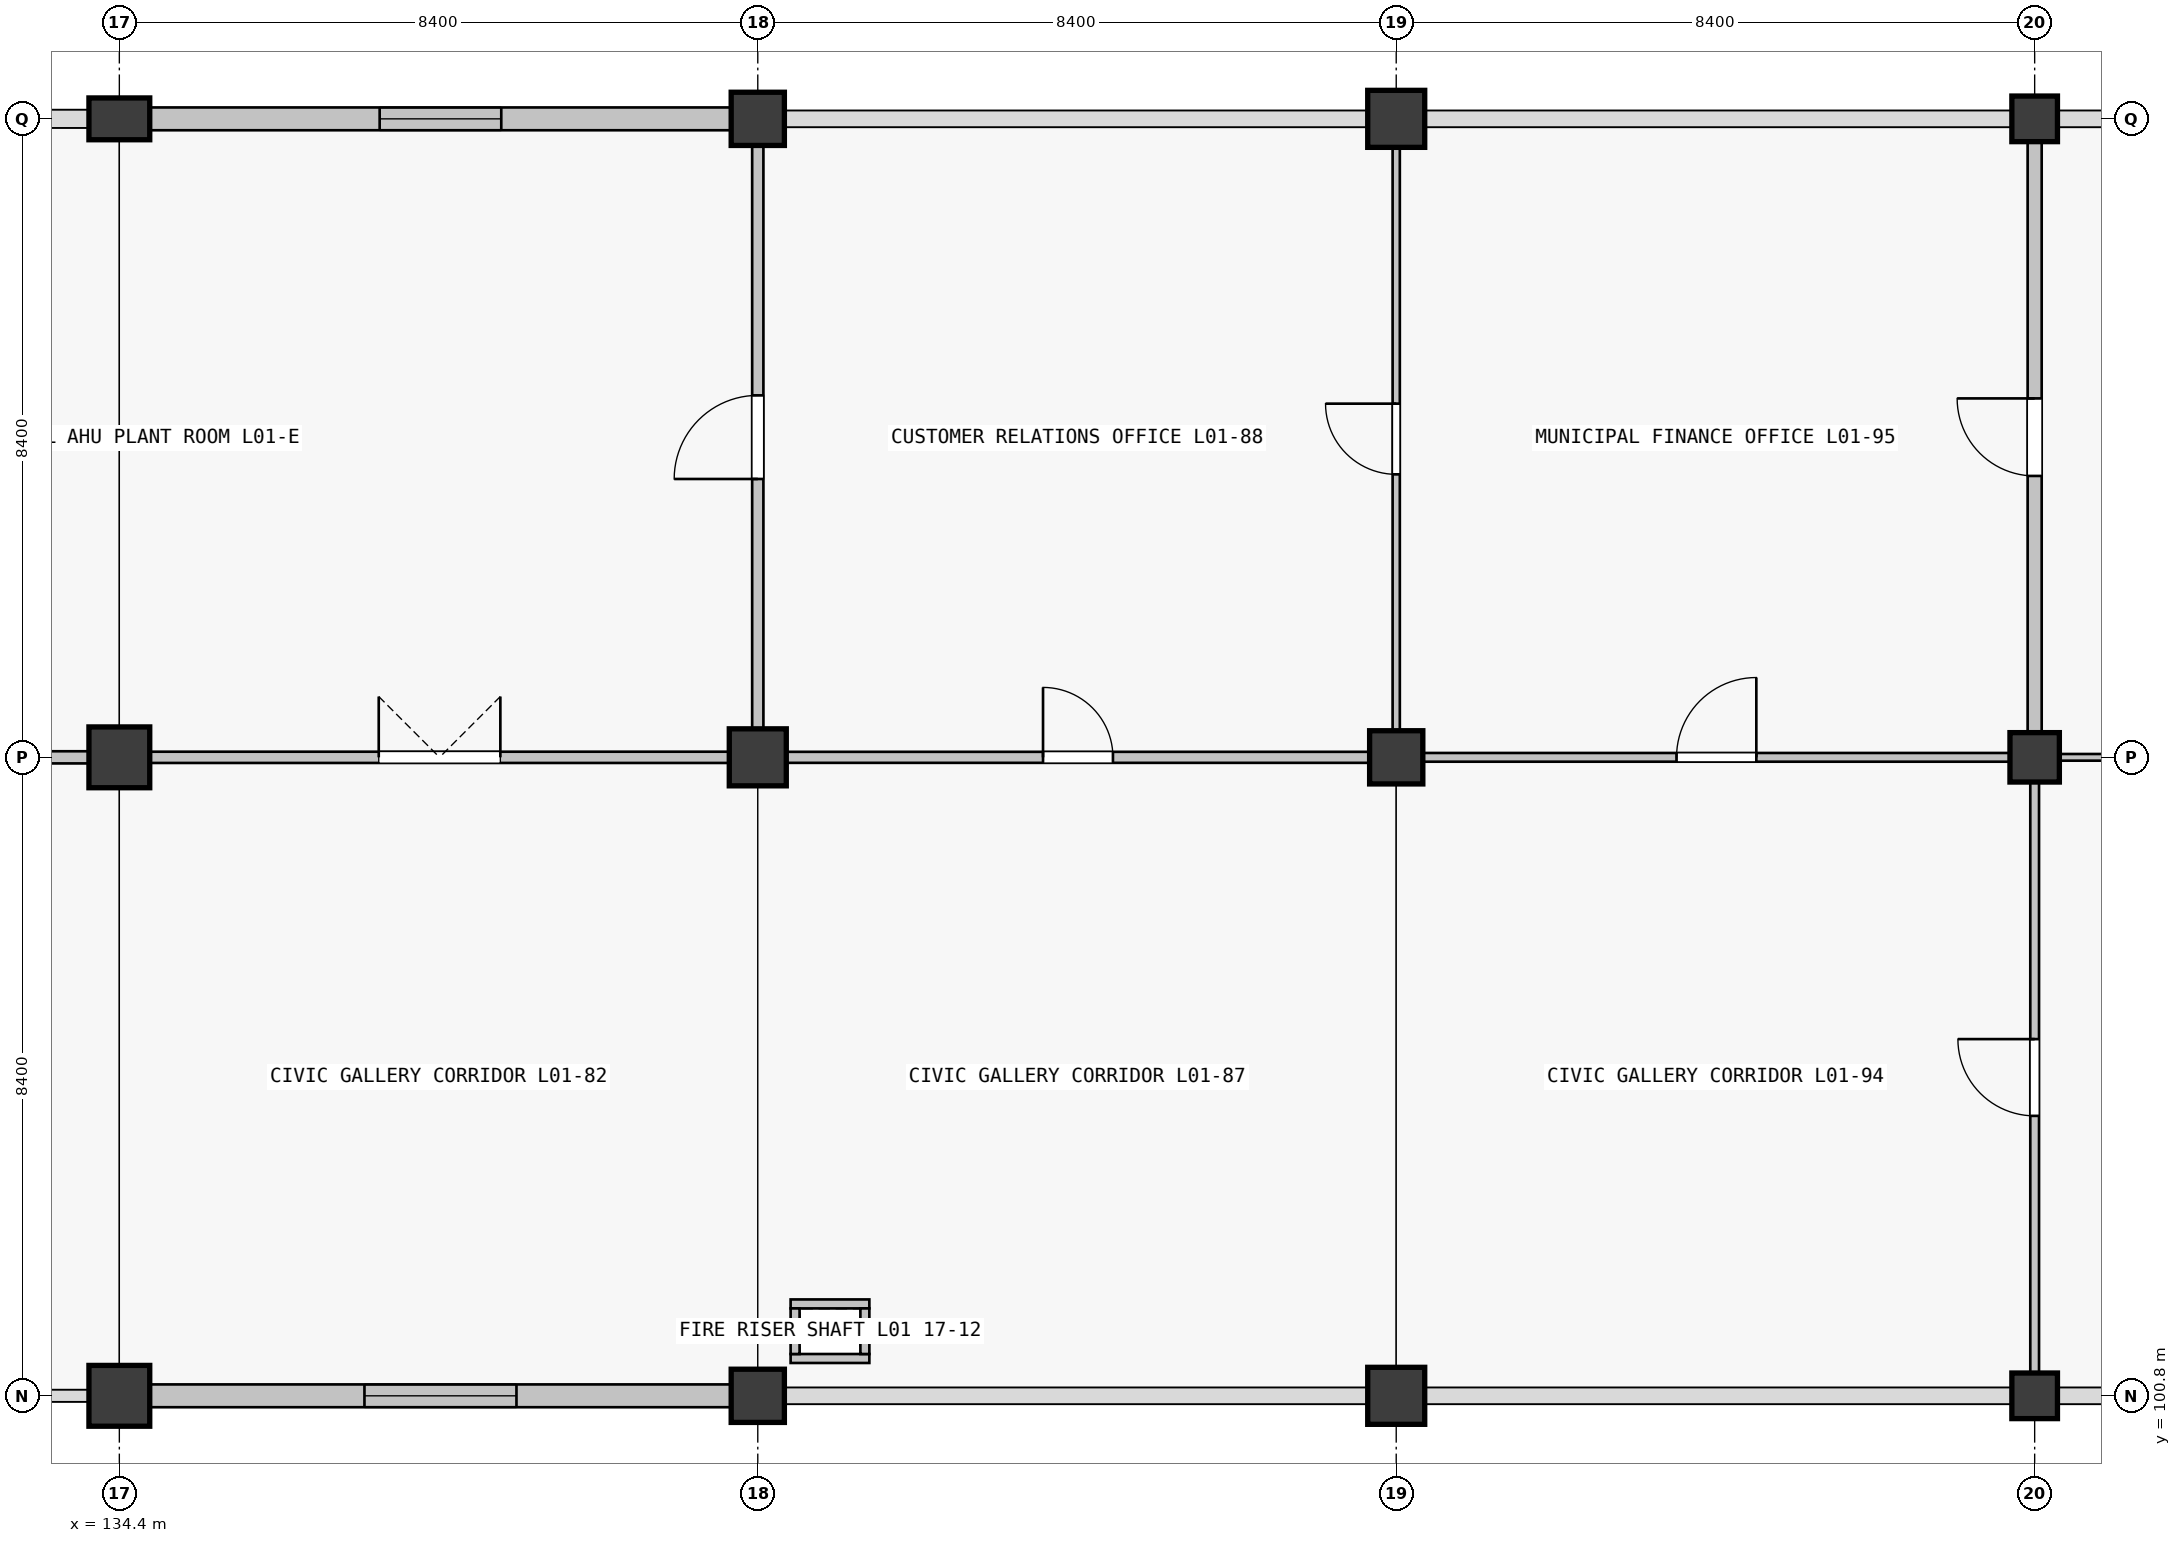
"""IFC4 building model, lengths in metres.
Left out: names, types, materials, properties, quantities, classifications, styles, units other than length and angle.
Written with IfcOpenShell. Run it as: python <this file> out.ifc"""

import sys

from ifc_helpers import new_model, si_unit, direction, frame, frame_2d, origin, origin_2d, place, context, subcontext, project, spatial, rectangle, extrude, element, fill, save


model = new_model("IFC4")
c1 = context("Model", 3, precision=1e-05, world=origin(), true_north=direction((0.0, 1.0)))
c2 = subcontext(c1, "Body", "Model", "MODEL_VIEW")
j1 = project(units=[si_unit("LENGTHUNIT", "METRE"), si_unit("PLANEANGLEUNIT", "RADIAN")], contexts=[c1])
p1 = place(None, origin())
s1 = spatial("IfcSite", under=j1, at=p1, CompositionType="ELEMENT")
p2 = place(p1, origin())
s2 = spatial("IfcBuilding", under=s1, at=p2, CompositionType="ELEMENT")
p3 = place(p2, frame((0.0, 0.0, 5.76)))
s3 = spatial("IfcBuildingStorey", under=s2, at=p3, CompositionType="ELEMENT", Elevation=5.76)
for number, where, z_axis, x_axis in (
    (1, (134.4, 100.8, 0.0), (0.0, 0.0, 1.0), (1.0, 0.0, 0.0)),
    (2, (134.4, 109.2, 0.0), (0.0, 0.0, 1.0), (1.0, 0.0, 0.0)),
):
    element("IfcColumn", number, at=place(p3, frame(where, z_axis=z_axis, x_axis=x_axis)), inside=s3, PredefinedType="COLUMN", context=c2, shape_type="SweptSolid", body=[
        extrude(rectangle(XDim=0.8, YDim=0.8, at=origin_2d()), origin(), (0.0, 0.0, 1.0), 4.5),
    ])
p4 = place(p3, frame((134.4, 117.6, 0.0), z_axis=(0.0, 0.0, 1.0), x_axis=(1.0, 0.0, 0.0)))
e3 = element("IfcColumn", 3, at=p4, inside=s3, PredefinedType="COLUMN", context=c2, shape_type="SweptSolid", body=[
    extrude(rectangle(XDim=0.8, YDim=0.55, at=origin_2d()), origin(), (0.0, 0.0, 1.0), 4.5),
])
p5 = place(p3, frame((142.8, 100.8, 0.0), z_axis=(0.0, 0.0, 1.0), x_axis=(1.0, 0.0, 0.0)))
e4 = element("IfcColumn", 4, at=p5, inside=s3, PredefinedType="COLUMN", context=c2, shape_type="SweptSolid", body=[
    extrude(rectangle(XDim=0.7, YDim=0.7, at=origin_2d()), origin(), (0.0, 0.0, 1.0), 4.5),
])
p6 = place(p3, frame((142.8, 109.2, 0.0), z_axis=(0.0, 0.0, 1.0), x_axis=(1.0, 0.0, 0.0)))
e5 = element("IfcColumn", 5, at=p6, inside=s3, PredefinedType="COLUMN", context=c2, shape_type="SweptSolid", body=[
    extrude(rectangle(XDim=0.75, YDim=0.75, at=origin_2d()), origin(), (0.0, 0.0, 1.0), 4.5),
])
p7 = place(p3, frame((142.8, 117.6, 0.0), z_axis=(0.0, 0.0, 1.0), x_axis=(1.0, 0.0, 0.0)))
e6 = element("IfcColumn", 6, at=p7, inside=s3, PredefinedType="COLUMN", context=c2, shape_type="SweptSolid", body=[
    extrude(rectangle(XDim=0.7, YDim=0.7, at=origin_2d()), origin(), (0.0, 0.0, 1.0), 4.5),
])
p8 = place(p3, frame((151.2, 100.8, 0.0), z_axis=(0.0, 0.0, 1.0), x_axis=(1.0, 0.0, 0.0)))
e7 = element("IfcColumn", 7, at=p8, inside=s3, PredefinedType="COLUMN", context=c2, shape_type="SweptSolid", body=[
    extrude(rectangle(XDim=0.75, YDim=0.75, at=origin_2d()), origin(), (0.0, 0.0, 1.0), 4.5),
])
p9 = place(p3, frame((151.2, 109.2, 0.0), z_axis=(0.0, 0.0, 1.0), x_axis=(1.0, 0.0, 0.0)))
e8 = element("IfcColumn", 8, at=p9, inside=s3, PredefinedType="COLUMN", context=c2, shape_type="SweptSolid", body=[
    extrude(rectangle(XDim=0.7, YDim=0.7, at=origin_2d()), origin(), (0.0, 0.0, 1.0), 4.5),
])
p10 = place(p3, frame((151.2, 117.6, 0.0), z_axis=(0.0, 0.0, 1.0), x_axis=(1.0, 0.0, 0.0)))
e9 = element("IfcColumn", 9, at=p10, inside=s3, PredefinedType="COLUMN", context=c2, shape_type="SweptSolid", body=[
    extrude(rectangle(XDim=0.75, YDim=0.75, at=origin_2d()), origin(), (0.0, 0.0, 1.0), 4.5),
])
p11 = place(p3, frame((159.6, 100.8, 0.0), z_axis=(0.0, 0.0, 1.0), x_axis=(1.0, 0.0, 0.0)))
e10 = element("IfcColumn", 10, at=p11, inside=s3, PredefinedType="COLUMN", context=c2, shape_type="SweptSolid", body=[
    extrude(rectangle(XDim=0.6, YDim=0.6, at=origin_2d()), origin(), (0.0, 0.0, 1.0), 4.5),
])
p12 = place(p3, frame((159.6, 109.2, 0.0), z_axis=(0.0, 0.0, 1.0), x_axis=(1.0, 0.0, 0.0)))
e11 = element("IfcColumn", 11, at=p12, inside=s3, PredefinedType="COLUMN", context=c2, shape_type="SweptSolid", body=[
    extrude(rectangle(XDim=0.65, YDim=0.65, at=origin_2d()), origin(), (0.0, 0.0, 1.0), 4.5),
])
p13 = place(p3, frame((159.6, 117.6, 0.0), z_axis=(0.0, 0.0, 1.0), x_axis=(1.0, 0.0, 0.0)))
e12 = element("IfcColumn", 12, at=p13, inside=s3, PredefinedType="COLUMN", context=c2, shape_type="SweptSolid", body=[
    extrude(rectangle(XDim=0.6, YDim=0.6, at=origin_2d()), origin(), (0.0, 0.0, 1.0), 4.5),
])
p14 = place(p3, frame((142.449, 100.8, 0.0), z_axis=(0.0, 0.0, 1.0), x_axis=(-1.0, 0.0, 0.0)))
e13 = element("IfcWall", 13, at=p14, inside=s3, PredefinedType="SOLIDWALL", context=c2, shape_type="SweptSolid", body=[
    extrude(rectangle(XDim=7.648, YDim=0.3, at=frame_2d((3.824, 0.0))), origin(), (0.0, 0.0, 1.0), 3.4),
])
p15 = place(p14, frame((2.824, 0.0, 0.9)))
e14 = element("IfcOpeningElement", 14, at=p15, cuts=e13, PredefinedType="OPENING", context=c2, shape_type="SweptSolid", body=[
    extrude(rectangle(XDim=2.0, YDim=2.25, at=frame_2d((1.0, 1.125))), frame((0.0, 0.15, 0.0), z_axis=(0.0, -1.0, 0.0), x_axis=(1.0, 0.0, 0.0)), (0.0, 0.0, 1.0), 0.3),
])
p16 = place(p3, frame((134.801, 117.6, 0.0), z_axis=(0.0, 0.0, 1.0), x_axis=(1.0, 0.0, 0.0)))
e15 = element("IfcWall", 15, at=p16, inside=s3, PredefinedType="SOLIDWALL", context=c2, shape_type="SweptSolid", body=[
    extrude(rectangle(XDim=7.648, YDim=0.3, at=frame_2d((3.824, 0.0))), origin(), (0.0, 0.0, 1.0), 3.4),
])
p17 = place(p16, frame((3.024, 0.0, 0.9)))
e16 = element("IfcOpeningElement", 16, at=p17, cuts=e15, PredefinedType="OPENING", context=c2, shape_type="SweptSolid", body=[
    extrude(rectangle(XDim=1.6, YDim=2.25, at=frame_2d((0.8, 1.125))), frame((0.0, 0.15, 0.0), z_axis=(0.0, -1.0, 0.0), x_axis=(1.0, 0.0, 0.0)), (0.0, 0.0, 1.0), 0.3),
])
for number, where, z_axis, x_axis in (
    (17, (143.232, 101.291, 0.0), (0.0, 0.0, 1.0), (1.0, 0.0, 0.0)),
    (18, (143.232, 102.009, 0.0), (0.0, 0.0, 1.0), (1.0, 0.0, 0.0)),
):
    element("IfcWall", number, at=place(p3, frame(where, z_axis=z_axis, x_axis=x_axis)), inside=s3, PredefinedType="PARTITIONING", context=c2, shape_type="SweptSolid", body=[
        extrude(rectangle(XDim=1.036, YDim=0.118, at=frame_2d((0.518, 0.0))), origin(), (0.0, 0.0, 1.0), 3.48),
    ])
for number, where, z_axis, x_axis in (
    (19, (143.291, 101.35, 0.0), (0.0, 0.0, 1.0), (0.0, 1.0, 0.0)),
    (20, (144.209, 101.35, 0.0), (0.0, 0.0, 1.0), (0.0, 1.0, 0.0)),
):
    element("IfcWall", number, at=place(p3, frame(where, z_axis=z_axis, x_axis=x_axis)), inside=s3, PredefinedType="PARTITIONING", context=c2, shape_type="SweptSolid", body=[
        extrude(rectangle(XDim=0.6, YDim=0.118, at=frame_2d((0.3, 0.0))), origin(), (0.0, 0.0, 1.0), 3.48),
    ])
p18 = place(p3, frame((126.452, 109.2, 0.0), z_axis=(0.0, 0.0, 1.0), x_axis=(1.0, 0.0, 0.0)))
e21 = element("IfcWall", 21, at=p18, inside=s3, PredefinedType="PARTITIONING", context=c2, shape_type="SweptSolid", body=[
    extrude(rectangle(XDim=7.546, YDim=0.16, at=frame_2d((3.773, 0.0))), origin(), (0.0, 0.0, 1.0), 2.4),
])
p19 = place(p18, frame((3.323, 0.0, 0.0)))
e22 = element("IfcOpeningElement", 22, at=p19, cuts=e21, PredefinedType="OPENING", context=c2, shape_type="SweptSolid", body=[
    extrude(rectangle(XDim=0.9, YDim=2.05, at=frame_2d((0.45, 1.025))), frame((0.0, 0.08, 0.0), z_axis=(0.0, -1.0, 0.0), x_axis=(1.0, 0.0, 0.0)), (0.0, 0.0, 1.0), 0.16),
])
p20 = place(p3, frame((134.802, 109.2, 0.0), z_axis=(0.0, 0.0, 1.0), x_axis=(1.0, 0.0, 0.0)))
e23 = element("IfcWall", 23, at=p20, inside=s3, PredefinedType="PARTITIONING", context=c2, shape_type="SweptSolid", body=[
    extrude(rectangle(XDim=7.621, YDim=0.148, at=frame_2d((3.811, 0.0))), origin(), (0.0, 0.0, 1.0), 2.4),
])
p21 = place(p20, frame((3.011, 0.0, 0.0)))
e24 = element("IfcOpeningElement", 24, at=p21, cuts=e23, PredefinedType="OPENING", context=c2, shape_type="SweptSolid", body=[
    extrude(rectangle(XDim=1.6, YDim=2.2, at=frame_2d((0.8, 1.1))), frame((0.0, 0.074, 0.0), z_axis=(0.0, -1.0, 0.0), x_axis=(1.0, 0.0, 0.0)), (0.0, 0.0, 1.0), 0.148),
])
p22 = place(p3, frame((143.177, 109.2, 0.0), z_axis=(0.0, 0.0, 1.0), x_axis=(1.0, 0.0, 0.0)))
e25 = element("IfcWall", 25, at=p22, inside=s3, PredefinedType="PARTITIONING", context=c2, shape_type="SweptSolid", body=[
    extrude(rectangle(XDim=7.671, YDim=0.145, at=frame_2d((3.835, 0.0))), origin(), (0.0, 0.0, 1.0), 2.4),
])
p23 = place(p22, frame((3.376, 0.0, 0.0)))
e26 = element("IfcOpeningElement", 26, at=p23, cuts=e25, PredefinedType="OPENING", context=c2, shape_type="SweptSolid", body=[
    extrude(rectangle(XDim=0.92, YDim=2.15, at=frame_2d((0.46, 1.075))), frame((0.0, 0.073, 0.0), z_axis=(0.0, -1.0, 0.0), x_axis=(1.0, 0.0, 0.0)), (0.0, 0.0, 1.0), 0.145),
])
p24 = place(p3, frame((151.552, 109.2, 0.0), z_axis=(0.0, 0.0, 1.0), x_axis=(1.0, 0.0, 0.0)))
e27 = element("IfcWall", 27, at=p24, inside=s3, PredefinedType="PARTITIONING", context=c2, shape_type="SweptSolid", body=[
    extrude(rectangle(XDim=7.721, YDim=0.115, at=frame_2d((3.86, 0.0))), origin(), (0.0, 0.0, 1.0), 2.4),
])
p25 = place(p24, frame((3.336, 0.0, 0.0)))
e28 = element("IfcOpeningElement", 28, at=p25, cuts=e27, PredefinedType="OPENING", context=c2, shape_type="SweptSolid", body=[
    extrude(rectangle(XDim=1.05, YDim=2.12, at=frame_2d((0.525, 1.06))), frame((0.0, 0.058, 0.0), z_axis=(0.0, -1.0, 0.0), x_axis=(1.0, 0.0, 0.0)), (0.0, 0.0, 1.0), 0.115),
])
p26 = place(p3, frame((159.927, 109.2, 0.0), z_axis=(0.0, 0.0, 1.0), x_axis=(1.0, 0.0, 0.0)))
e29 = element("IfcWall", 29, at=p26, inside=s3, PredefinedType="PARTITIONING", context=c2, shape_type="SweptSolid", body=[
    extrude(rectangle(XDim=7.796, YDim=0.088, at=frame_2d((3.898, 0.0))), origin(), (0.0, 0.0, 1.0), 2.4),
])
p27 = place(p26, frame((3.433, 0.0, 0.0)))
e30 = element("IfcOpeningElement", 30, at=p27, cuts=e29, PredefinedType="OPENING", context=c2, shape_type="SweptSolid", body=[
    extrude(rectangle(XDim=0.93, YDim=2.12, at=frame_2d((0.465, 1.06))), frame((0.0, 0.044, 0.0), z_axis=(0.0, -1.0, 0.0), x_axis=(1.0, 0.0, 0.0)), (0.0, 0.0, 1.0), 0.088),
])
p28 = place(p3, frame((142.8, 109.577, 0.0), z_axis=(0.0, 0.0, 1.0), x_axis=(0.0, 1.0, 0.0)))
e31 = element("IfcWall", 31, at=p28, inside=s3, PredefinedType="PARTITIONING", context=c2, shape_type="SweptSolid", body=[
    extrude(rectangle(XDim=7.671, YDim=0.148, at=frame_2d((3.835, 0.0))), origin(), (0.0, 0.0, 1.0), 2.4),
])
p29 = place(p28, frame((3.285, 0.0, 0.0)))
e32 = element("IfcOpeningElement", 32, at=p29, cuts=e31, PredefinedType="OPENING", context=c2, shape_type="SweptSolid", body=[
    extrude(rectangle(XDim=1.1, YDim=2.15, at=frame_2d((0.55, 1.075))), frame((0.0, 0.074, 0.0), z_axis=(0.0, -1.0, 0.0), x_axis=(1.0, 0.0, 0.0)), (0.0, 0.0, 1.0), 0.148),
])
p30 = place(p3, frame((151.2, 109.552, 0.0), z_axis=(0.0, 0.0, 1.0), x_axis=(0.0, 1.0, 0.0)))
e33 = element("IfcWall", 33, at=p30, inside=s3, PredefinedType="PARTITIONING", context=c2, shape_type="SweptSolid", body=[
    extrude(rectangle(XDim=7.671, YDim=0.095, at=frame_2d((3.835, 0.0))), origin(), (0.0, 0.0, 1.0), 2.4),
])
p31 = place(p30, frame((3.371, 0.0, 0.0)))
e34 = element("IfcOpeningElement", 34, at=p31, cuts=e33, PredefinedType="OPENING", context=c2, shape_type="SweptSolid", body=[
    extrude(rectangle(XDim=0.93, YDim=2.12, at=frame_2d((0.465, 1.06))), frame((0.0, 0.047, 0.0), z_axis=(0.0, -1.0, 0.0), x_axis=(1.0, 0.0, 0.0)), (0.0, 0.0, 1.0), 0.095),
])
p32 = place(p3, frame((159.6, 101.102, 0.0), z_axis=(0.0, 0.0, 1.0), x_axis=(0.0, 1.0, 0.0)))
e35 = element("IfcWall", 35, at=p32, inside=s3, PredefinedType="PARTITIONING", context=c2, shape_type="SweptSolid", body=[
    extrude(rectangle(XDim=7.771, YDim=0.115, at=frame_2d((3.885, 0.0))), origin(), (0.0, 0.0, 1.0), 2.4),
])
p33 = place(p32, frame((3.381, 0.0, 0.0)))
e36 = element("IfcOpeningElement", 36, at=p33, cuts=e35, PredefinedType="OPENING", context=c2, shape_type="SweptSolid", body=[
    extrude(rectangle(XDim=1.01, YDim=2.12, at=frame_2d((0.505, 1.06))), frame((0.0, 0.058, 0.0), z_axis=(0.0, -1.0, 0.0), x_axis=(1.0, 0.0, 0.0)), (0.0, 0.0, 1.0), 0.115),
])
p34 = place(p3, frame((159.6, 109.527, 0.0), z_axis=(0.0, 0.0, 1.0), x_axis=(0.0, 1.0, 0.0)))
e37 = element("IfcWall", 37, at=p34, inside=s3, PredefinedType="PARTITIONING", context=c2, shape_type="SweptSolid", body=[
    extrude(rectangle(XDim=7.771, YDim=0.185, at=frame_2d((3.885, 0.0))), origin(), (0.0, 0.0, 1.0), 2.4),
])
p35 = place(p34, frame((3.375, 0.0, 0.0)))
e38 = element("IfcOpeningElement", 38, at=p35, cuts=e37, PredefinedType="OPENING", context=c2, shape_type="SweptSolid", body=[
    extrude(rectangle(XDim=1.02, YDim=2.2, at=frame_2d((0.51, 1.1))), frame((0.0, 0.093, 0.0), z_axis=(0.0, -1.0, 0.0), x_axis=(1.0, 0.0, 0.0)), (0.0, 0.0, 1.0), 0.185),
])
p36 = place(p15, origin())
e39 = element("IfcWindow", 39, at=p36, inside=s3, PartitioningType="SINGLE_PANEL", PredefinedType="WINDOW", context=c2, shape_type="SweptSolid", body=[
    extrude(rectangle(XDim=2.0, YDim=2.25, at=frame_2d((1.0, 1.125))), frame((0.0, 0.03, 0.0), z_axis=(0.0, -1.0, 0.0), x_axis=(1.0, 0.0, 0.0)), (0.0, 0.0, 1.0), 0.06),
])
fill(e14, e39)
p37 = place(p17, origin())
e40 = element("IfcWindow", 40, at=p37, inside=s3, PartitioningType="SINGLE_PANEL", PredefinedType="WINDOW", context=c2, shape_type="SweptSolid", body=[
    extrude(rectangle(XDim=1.6, YDim=2.25, at=frame_2d((0.8, 1.125))), frame((0.0, 0.03, 0.0), z_axis=(0.0, -1.0, 0.0), x_axis=(1.0, 0.0, 0.0)), (0.0, 0.0, 1.0), 0.06),
])
fill(e16, e40)
p38 = place(p21, origin())
e41 = element("IfcDoor", 41, at=p38, inside=s3, OperationType="DOUBLE_DOOR_SINGLE_SWING", PredefinedType="DOOR", context=c2, shape_type="SweptSolid", body=[
    extrude(rectangle(XDim=1.6, YDim=2.2, at=frame_2d((0.8, 1.1))), frame((0.0, 0.025, 0.0), z_axis=(0.0, -1.0, 0.0), x_axis=(1.0, 0.0, 0.0)), (0.0, 0.0, 1.0), 0.05),
])
fill(e24, e41)
p39 = place(p23, origin())
e42 = element("IfcDoor", 42, at=p39, inside=s3, OperationType="SINGLE_SWING_LEFT", PredefinedType="DOOR", context=c2, shape_type="SweptSolid", body=[
    extrude(rectangle(XDim=0.92, YDim=2.15, at=frame_2d((0.46, 1.075))), frame((0.0, 0.025, 0.0), z_axis=(0.0, -1.0, 0.0), x_axis=(1.0, 0.0, 0.0)), (0.0, 0.0, 1.0), 0.05),
])
fill(e26, e42)
p40 = place(p25, origin())
e43 = element("IfcDoor", 43, at=p40, inside=s3, OperationType="SINGLE_SWING_RIGHT", PredefinedType="DOOR", context=c2, shape_type="SweptSolid", body=[
    extrude(rectangle(XDim=1.05, YDim=2.12, at=frame_2d((0.525, 1.06))), frame((0.0, 0.025, 0.0), z_axis=(0.0, -1.0, 0.0), x_axis=(1.0, 0.0, 0.0)), (0.0, 0.0, 1.0), 0.05),
])
fill(e28, e43)
p41 = place(p33, origin())
e44 = element("IfcDoor", 44, at=p41, inside=s3, OperationType="SINGLE_SWING_RIGHT", PredefinedType="DOOR", context=c2, shape_type="SweptSolid", body=[
    extrude(rectangle(XDim=1.01, YDim=2.12, at=frame_2d((0.505, 1.06))), frame((0.0, 0.025, 0.0), z_axis=(0.0, -1.0, 0.0), x_axis=(1.0, 0.0, 0.0)), (0.0, 0.0, 1.0), 0.05),
])
fill(e36, e44)
p42 = place(p29, origin())
e45 = element("IfcDoor", 45, at=p42, inside=s3, OperationType="SINGLE_SWING_LEFT", PredefinedType="DOOR", context=c2, shape_type="SweptSolid", body=[
    extrude(rectangle(XDim=1.1, YDim=2.15, at=frame_2d((0.55, 1.075))), frame((0.0, 0.025, 0.0), z_axis=(0.0, -1.0, 0.0), x_axis=(1.0, 0.0, 0.0)), (0.0, 0.0, 1.0), 0.05),
])
fill(e32, e45)
p43 = place(p31, origin())
e46 = element("IfcDoor", 46, at=p43, inside=s3, OperationType="SINGLE_SWING_RIGHT", PredefinedType="DOOR", context=c2, shape_type="SweptSolid", body=[
    extrude(rectangle(XDim=0.93, YDim=2.12, at=frame_2d((0.465, 1.06))), frame((0.0, 0.025, 0.0), z_axis=(0.0, -1.0, 0.0), x_axis=(1.0, 0.0, 0.0)), (0.0, 0.0, 1.0), 0.05),
])
fill(e34, e46)
p44 = place(p35, origin())
e47 = element("IfcDoor", 47, at=p44, inside=s3, OperationType="SINGLE_SWING_RIGHT", PredefinedType="DOOR", context=c2, shape_type="SweptSolid", body=[
    extrude(rectangle(XDim=1.02, YDim=2.2, at=frame_2d((0.51, 1.1))), frame((0.0, 0.025, 0.0), z_axis=(0.0, -1.0, 0.0), x_axis=(1.0, 0.0, 0.0)), (0.0, 0.0, 1.0), 0.05),
])
fill(e38, e47)
save(model, sys.argv[1])
